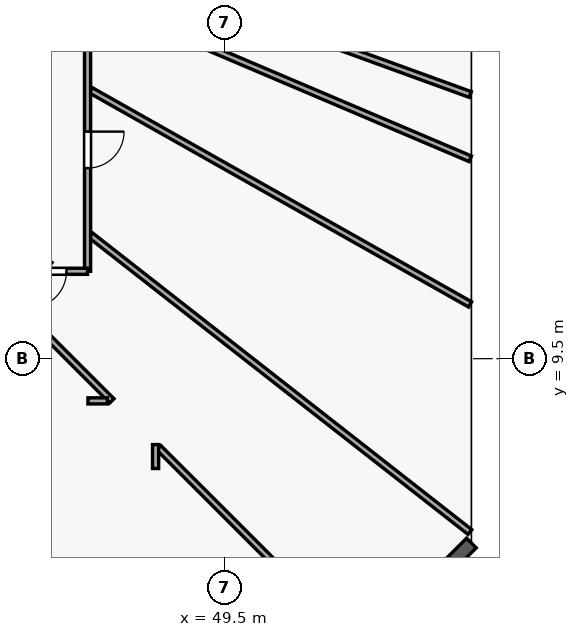
"""IFC4 building model, lengths in metres.
Left out: names, types, materials, properties, quantities, classifications, styles, units other than length and angle.
Written with IfcOpenShell. Run it as: python <this file> out.ifc"""

import sys

from ifc_helpers import new_model, si_unit, direction, frame, frame_2d, origin, origin_with_axes, origin_2d, place, context, subcontext, project, spatial, rectangle, circle, extrude, source, transform, mapped, element, fill, save


model = new_model("IFC4")
c1 = context("Model", 3, precision=1e-05, world=origin(), true_north=direction((0.0, 1.0)))
c2 = subcontext(c1, "Body", "Model", "MODEL_VIEW")
j1 = project(units=[si_unit("LENGTHUNIT", "METRE"), si_unit("PLANEANGLEUNIT", "RADIAN")], contexts=[c1])
p1 = place(None, origin())
s1 = spatial("IfcSite", under=j1, at=p1, CompositionType="ELEMENT")
p2 = place(p1, origin())
s2 = spatial("IfcBuilding", under=s1, at=p2, CompositionType="ELEMENT")
p3 = place(p2, frame((0.0, 0.0, 9.0)))
s3 = spatial("IfcBuildingStorey", under=s2, at=p3, CompositionType="ELEMENT", Elevation=9.0)
m1 = source(origin_with_axes(), c2, "Body", "SweptSolid", [
    extrude(circle(Radius=0.8, at=origin_2d()), origin(), (0.0, 0.0, 1.0), 4.5),
])
p4 = place(p3, frame((46.8, 7.5, 0.0), z_axis=(0.0, 0.0, 1.0), x_axis=(1.0, 0.0, 0.0)))
e1 = element("IfcColumn", 1, at=p4, inside=s3, PredefinedType="COLUMN", context=c2, shape_type="MappedRepresentation", body=[
    mapped(m1, transform((0.0, 0.0, 0.0), scale=1.0)),
])
m2 = source(origin_with_axes(), c2, "Body", "SweptSolid", [
    extrude(rectangle(XDim=0.6, YDim=0.9, at=origin_2d()), origin(), (0.0, 0.0, 1.0), 4.5),
])
p5 = place(p3, frame((54.8, 10.5, 0.0), z_axis=(0.0, 0.0, 1.0), x_axis=(1.0, 0.0, 0.0)))
e2 = element("IfcColumn", 2, at=p5, inside=s3, PredefinedType="PILASTER", context=c2, shape_type="MappedRepresentation", body=[
    mapped(m2, transform((0.0, 0.0, 0.0), scale=1.0)),
])
p6 = place(p3, frame((54.6, 3.25, 0.0), z_axis=(0.0, 0.0, 1.0), x_axis=(0.707106781187, 0.707106781187, 0.0)))
e3 = element("IfcWall", 3, at=p6, inside=s3, PredefinedType="SOLIDWALL", context=c2, shape_type="SweptSolid", body=[
    extrude(rectangle(XDim=1.98, YDim=0.36, at=frame_2d((0.99, 0.0))), origin(), (0.0, 0.0, 1.0), 4.2),
])
p7 = place(p3, frame((40.932, 21.151, 0.0), z_axis=(0.0, 0.0, 1.0), x_axis=(0.920324867376, -0.39115487788, 0.0)))
e4 = element("IfcWall", 4, at=p7, inside=s3, PredefinedType="PARTITIONING", context=c2, shape_type="SweptSolid", body=[
    extrude(rectangle(XDim=16.34, YDim=0.16, at=frame_2d((8.17, 0.0))), origin(), (0.0, 0.0, 1.0), 4.2),
])
p8 = place(p7, frame((7.677, 0.0, 0.0)))
e5 = element("IfcOpeningElement", 5, at=p8, cuts=e4, PredefinedType="OPENING", context=c2, shape_type="SweptSolid", body=[
    extrude(rectangle(XDim=0.96, YDim=2.15, at=frame_2d((0.48, 1.075))), frame((0.0, 0.09, 0.0), z_axis=(0.0, -1.0, 0.0), x_axis=(1.0, 0.0, 0.0)), (0.0, 0.0, 1.0), 0.18),
])
p9 = place(p3, frame((40.918, 21.922, 0.0), z_axis=(0.0, 0.0, 1.0), x_axis=(0.93983791992, -0.341620673088, 0.0)))
e6 = element("IfcWall", 6, at=p9, inside=s3, PredefinedType="PARTITIONING", context=c2, shape_type="SweptSolid", body=[
    extrude(rectangle(XDim=16.017, YDim=0.16, at=frame_2d((8.008, 0.0))), origin(), (0.0, 0.0, 1.0), 4.2),
])
p10 = place(p3, frame((36.856, 14.868, 0.0), z_axis=(0.0, 0.0, 1.0), x_axis=(0.586848404005, -0.809696826422, 0.0)))
e7 = element("IfcWall", 7, at=p10, inside=s3, PredefinedType="PARTITIONING", context=c2, shape_type="SweptSolid", body=[
    extrude(rectangle(XDim=14.302, YDim=0.16, at=frame_2d((7.151, 0.0))), origin(), (0.0, 0.0, 1.0), 4.2),
])
p11 = place(p10, frame((6.659, 0.0, 0.0)))
e8 = element("IfcOpeningElement", 8, at=p11, cuts=e7, PredefinedType="OPENING", context=c2, shape_type="SweptSolid", body=[
    extrude(rectangle(XDim=0.96, YDim=2.15, at=frame_2d((0.48, 1.075))), frame((0.0, 0.09, 0.0), z_axis=(0.0, -1.0, 0.0), x_axis=(1.0, 0.0, 0.0)), (0.0, 0.0, 1.0), 0.18),
])
p12 = place(p3, frame((45.982, 12.746, 0.0), z_axis=(0.0, 0.0, 1.0), x_axis=(0.787599730353, -0.616187199436, 0.0)))
e9 = element("IfcWall", 9, at=p12, inside=s3, PredefinedType="PARTITIONING", context=c2, shape_type="SweptSolid", body=[
    extrude(rectangle(XDim=12.67, YDim=0.16, at=frame_2d((6.335, 0.0))), origin(), (0.0, 0.0, 1.0), 4.2),
])
p13 = place(p3, frame((45.982, 16.563, 0.0), z_axis=(0.0, 0.0, 1.0), x_axis=(0.870851801876, -0.491545663362, 0.0)))
e10 = element("IfcWall", 10, at=p13, inside=s3, PredefinedType="PARTITIONING", context=c2, shape_type="SweptSolid", body=[
    extrude(rectangle(XDim=11.465, YDim=0.16, at=frame_2d((5.733, 0.0))), origin(), (0.0, 0.0, 1.0), 4.2),
])
p14 = place(p3, frame((45.9, 18.2, 0.0), z_axis=(0.0, 0.0, 1.0), x_axis=(0.0, -1.0, 0.0)))
e11 = element("IfcWall", 11, at=p14, inside=s3, PredefinedType="PARTITIONING", context=c2, shape_type="SweptSolid", body=[
    extrude(rectangle(XDim=6.4, YDim=0.16, at=frame_2d((3.2, 0.0))), origin(), (0.0, 0.0, 1.0), 4.2),
])
p15 = place(p14, frame((2.725, 0.0, 0.0)))
e12 = element("IfcOpeningElement", 12, at=p15, cuts=e11, PredefinedType="OPENING", context=c2, shape_type="SweptSolid", body=[
    extrude(rectangle(XDim=0.96, YDim=2.15, at=frame_2d((0.48, 1.075))), frame((0.0, 0.09, 0.0), z_axis=(0.0, -1.0, 0.0), x_axis=(1.0, 0.0, 0.0)), (0.0, 0.0, 1.0), 0.18),
])
p16 = place(p3, frame((47.772, 7.158, 0.0), z_axis=(0.0, 0.0, 1.0), x_axis=(0.707397041121, -0.706816402055, 0.0)))
e13 = element("IfcWall", 13, at=p16, inside=s3, PredefinedType="PARTITIONING", context=c2, shape_type="SweptSolid", body=[
    extrude(rectangle(XDim=5.466, YDim=0.16, at=frame_2d((2.733, 0.0))), origin(), (0.0, 0.0, 1.0), 4.2),
])
p17 = place(p3, frame((43.153, 11.773, 0.0), z_axis=(0.0, 0.0, 1.0), x_axis=(0.707361787394, -0.706851682982, 0.0)))
e14 = element("IfcWall", 14, at=p17, inside=s3, PredefinedType="PARTITIONING", context=c2, shape_type="SweptSolid", body=[
    extrude(rectangle(XDim=4.786, YDim=0.16, at=frame_2d((2.393, 0.0))), origin(), (0.0, 0.0, 1.0), 3.25),
])
p18 = place(p3, frame((45.9, 11.8, 0.0), z_axis=(0.0, 0.0, 1.0), x_axis=(-1.0, 0.0, 0.0)))
e15 = element("IfcWall", 15, at=p18, inside=s3, PredefinedType="PARTITIONING", context=c2, shape_type="SweptSolid", body=[
    extrude(rectangle(XDim=2.435, YDim=0.16, at=frame_2d((1.217, 0.0))), origin(), (0.0, 0.0, 1.0), 4.2),
])
p19 = place(p18, frame((0.555, 0.0, 0.0)))
e16 = element("IfcOpeningElement", 16, at=p19, cuts=e15, PredefinedType="OPENING", context=c2, shape_type="SweptSolid", body=[
    extrude(rectangle(XDim=0.96, YDim=2.15, at=frame_2d((0.48, 1.075))), frame((0.0, 0.09, 0.0), z_axis=(0.0, -1.0, 0.0), x_axis=(1.0, 0.0, 0.0)), (0.0, 0.0, 1.0), 0.18),
])
p20 = place(p3, frame((47.69, 6.61, 0.0), z_axis=(0.0, 0.0, 1.0), x_axis=(0.0, 1.0, 0.0)))
e17 = element("IfcWall", 17, at=p20, inside=s3, PredefinedType="PARTITIONING", context=c2, shape_type="SweptSolid", body=[
    extrude(rectangle(XDim=0.629, YDim=0.16, at=frame_2d((0.315, 0.0))), origin(), (0.0, 0.0, 1.0), 4.2),
])
p21 = place(p3, frame((46.423, 8.39, 0.0), z_axis=(0.0, 0.0, 1.0), x_axis=(-1.0, 0.0, 0.0)))
e18 = element("IfcWall", 18, at=p21, inside=s3, PredefinedType="PARTITIONING", context=c2, shape_type="SweptSolid", body=[
    extrude(rectangle(XDim=0.513, YDim=0.16, at=frame_2d((0.256, 0.0))), origin(), (0.0, 0.0, 1.0), 4.2),
])
m3 = source(origin_with_axes(), c2, "Body", "SweptSolid", [
    extrude(rectangle(XDim=0.96, YDim=2.15, at=frame_2d((0.48, 1.075))), frame((0.0, 0.025, 0.0), z_axis=(0.0, -1.0, 0.0), x_axis=(1.0, 0.0, 0.0)), (0.0, 0.0, 1.0), 0.05),
])
p22 = place(p19, origin())
e19 = element("IfcDoor", 19, at=p22, inside=s3, OperationType="SINGLE_SWING_RIGHT", PredefinedType="DOOR", context=c2, shape_type="MappedRepresentation", body=[
    mapped(m3, transform((0.0, 0.0, 0.0), scale=1.0)),
])
fill(e16, e19)
p23 = place(p15, origin())
e20 = element("IfcDoor", 20, at=p23, inside=s3, OperationType="SINGLE_SWING_LEFT", PredefinedType="DOOR", context=c2, shape_type="MappedRepresentation", body=[
    mapped(m3, transform((0.0, 0.0, 0.0), scale=1.0)),
])
fill(e12, e20)
save(model, sys.argv[1])
